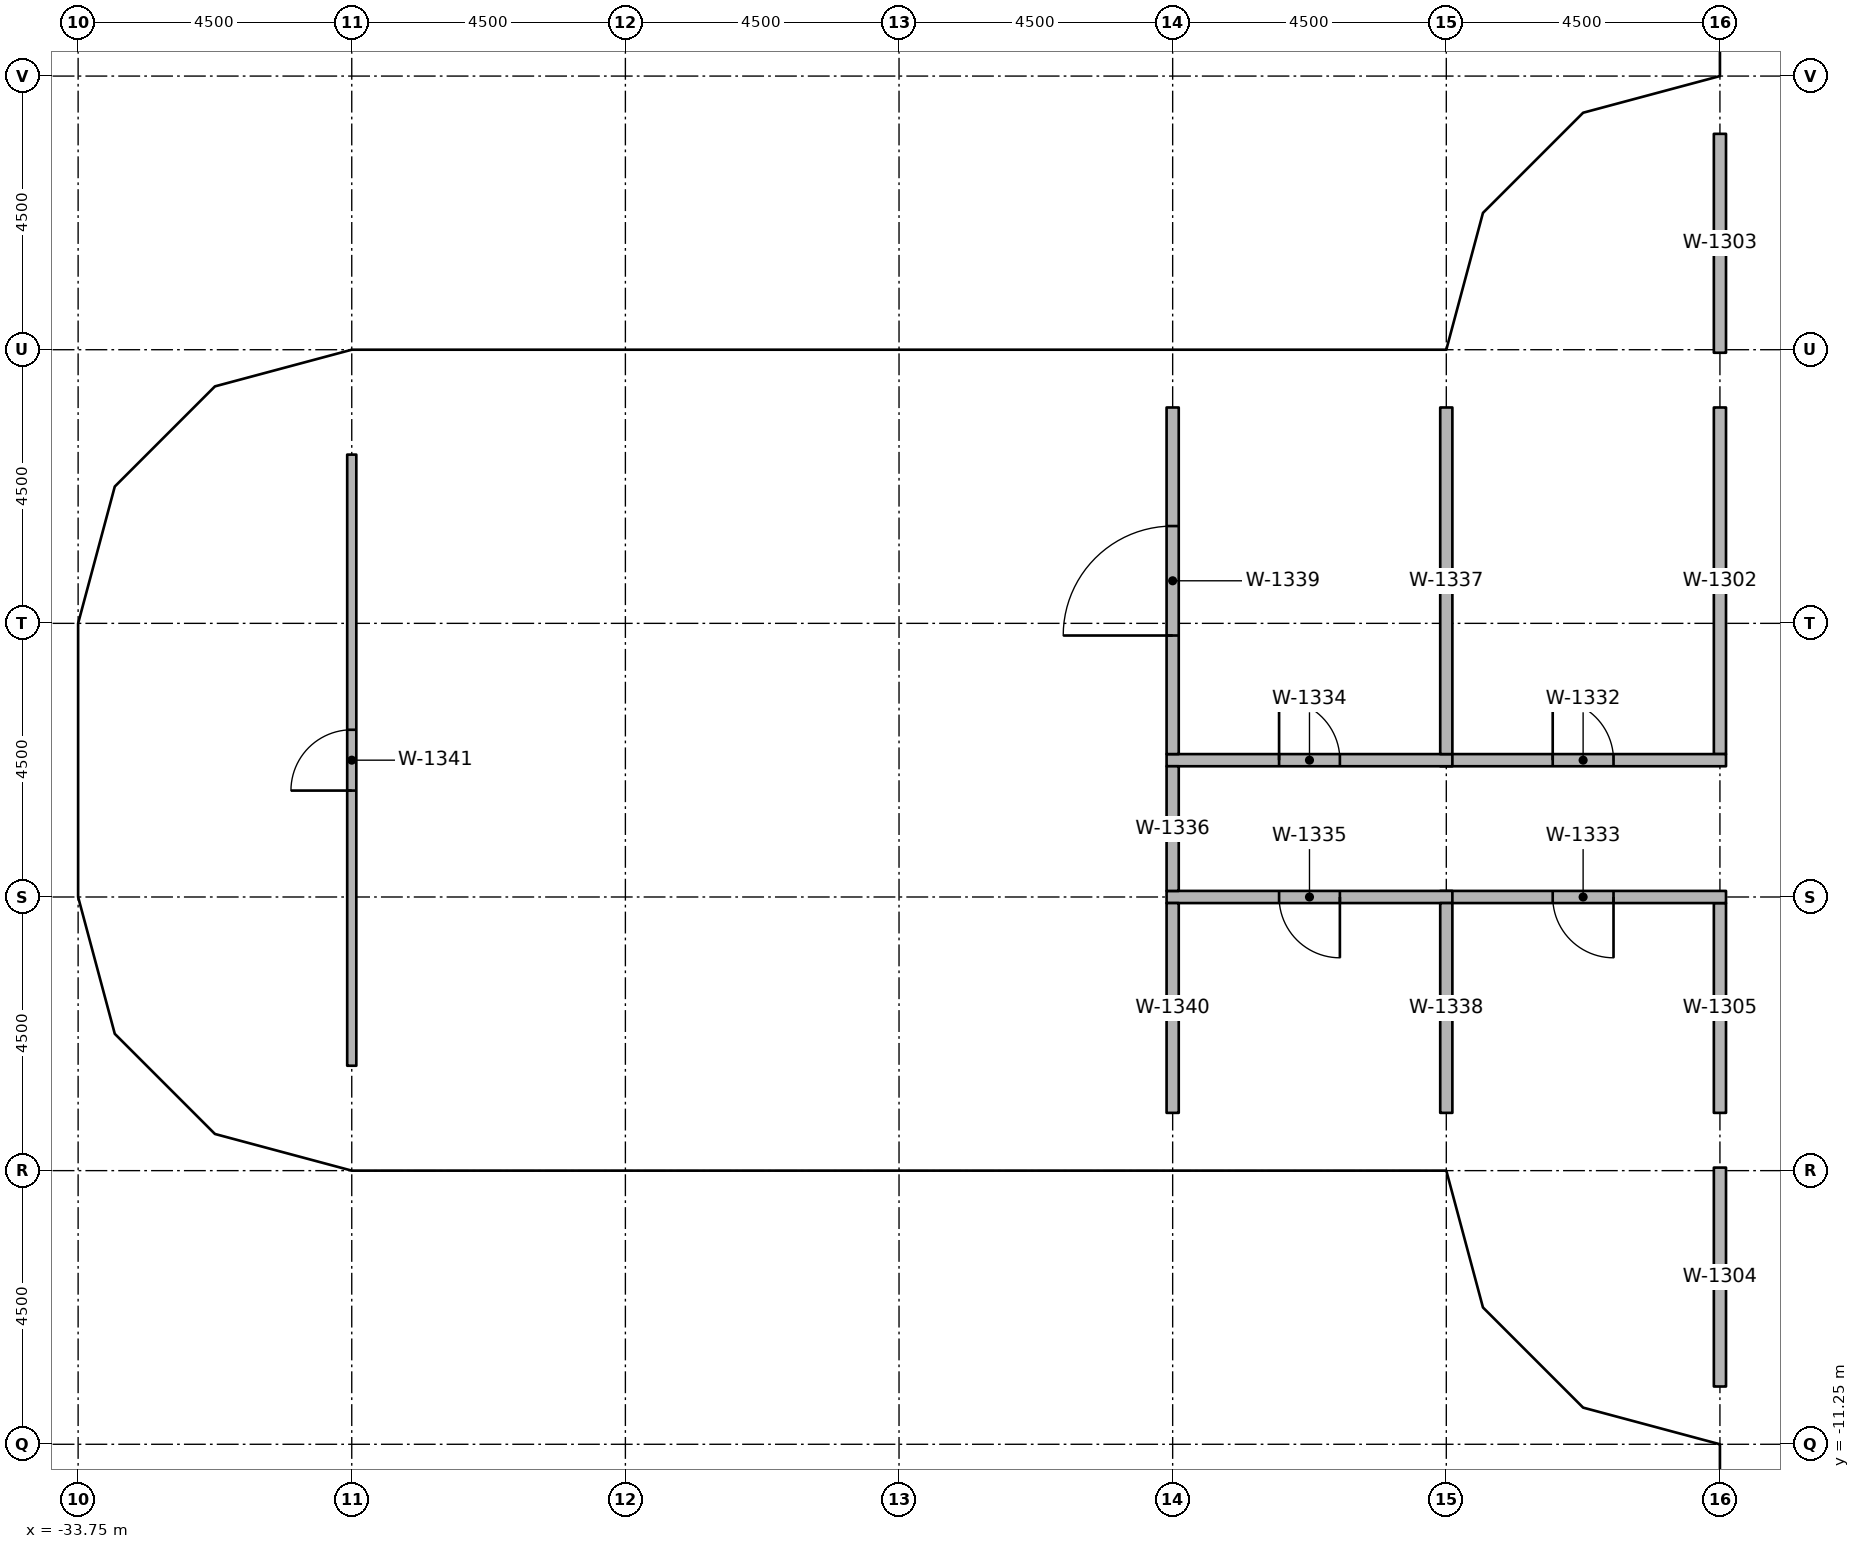
"""IFC4 building model, lengths in metres.
Left out: names, types, materials, properties, quantities, classifications, styles, units other than length and angle.
Written with IfcOpenShell. Run it as: python <this file> out.ifc"""

import sys

from ifc_helpers import new_model, si_unit, direction, frame, frame_2d, origin, origin_2d, place, context, subcontext, project, spatial, rectangle, extrude, element, fill, save


model = new_model("IFC4")
c1 = context("Model", 3, precision=1e-05, world=origin(), true_north=direction((0.0, 1.0)))
c2 = subcontext(c1, "Body", "Model", "MODEL_VIEW")
j1 = project(units=[si_unit("LENGTHUNIT", "METRE"), si_unit("PLANEANGLEUNIT", "RADIAN")], contexts=[c1])
p1 = place(None, origin())
s1 = spatial("IfcSite", under=j1, at=p1, CompositionType="ELEMENT")
p2 = place(p1, origin())
s2 = spatial("IfcBuilding", under=s1, at=p2, CompositionType="ELEMENT")
p3 = place(p2, frame((0.0, 0.0, 132.2)))
s3 = spatial("IfcBuildingStorey", under=s2, at=p3, CompositionType="ELEMENT", Elevation=132.2)
for number, where, z_axis, x_axis in (
    (1, (-33.11, -2.25, 0.0), (0.0, 0.0, 1.0), (1.0, 0.0, 0.0)),
    (2, (-33.11, 2.25, 0.0), (0.0, 0.0, 1.0), (1.0, 0.0, 0.0)),
    (3, (-28.908, -5.475, 0.0), (0.0, 0.0, 1.0), (1.0, 0.0, 0.0)),
    (4, (-28.908, 5.475, 0.0), (0.0, 0.0, 1.0), (1.0, 0.0, 0.0)),
    (5, (-24.75, -6.25, 0.0), (0.0, 0.0, 1.0), (1.0, 0.0, 0.0)),
    (6, (-24.75, 6.25, 0.0), (0.0, 0.0, 1.0), (1.0, 0.0, 0.0)),
    (7, (-20.25, -6.11, 0.0), (0.0, 0.0, 1.0), (1.0, 0.0, 0.0)),
    (8, (-20.25, 6.11, 0.0), (0.0, 0.0, 1.0), (1.0, 0.0, 0.0)),
    (9, (-15.75, -6.25, 0.0), (0.0, 0.0, 1.0), (1.0, 0.0, 0.0)),
    (10, (-15.75, 6.25, 0.0), (0.0, 0.0, 1.0), (1.0, 0.0, 0.0)),
    (11, (-10.75, -6.25, 0.0), (0.0, 0.0, 1.0), (1.0, 0.0, 0.0)),
    (12, (-10.75, 6.25, 0.0), (0.0, 0.0, 1.0), (1.0, 0.0, 0.0)),
    (13, (-6.25, -10.75, 0.0), (0.0, 0.0, 1.0), (1.0, 0.0, 0.0)),
    (14, (-6.25, -6.25, 0.0), (0.0, 0.0, 1.0), (1.0, 0.0, 0.0)),
    (15, (-6.25, 6.25, 0.0), (0.0, 0.0, 1.0), (1.0, 0.0, 0.0)),
    (16, (-6.25, 10.75, 0.0), (0.0, 0.0, 1.0), (1.0, 0.0, 0.0)),
):
    element("IfcColumn", number, at=place(p3, frame(where, z_axis=z_axis, x_axis=x_axis)), inside=s3, PredefinedType="COLUMN", context=c2, shape_type="SweptSolid", body=[
        extrude(rectangle(XDim=0.9, YDim=0.9, at=origin_2d()), origin(), (0.0, 0.0, 1.0), 3.65),
    ])
p4 = place(p3, frame((-6.75, 0.1, 0.0), z_axis=(0.0, 0.0, 1.0), x_axis=(0.0, 1.0, 0.0)))
e17 = element("IfcWall", 17, at=p4, inside=s3, PredefinedType="PARTITIONING", context=c2, shape_type="SweptSolid", body=[
    extrude(rectangle(XDim=5.7, YDim=0.2, at=frame_2d((2.85, 0.0))), origin(), (0.0, 0.0, 1.0), 2.738),
])
for number, where, z_axis, x_axis in (
    (18, (-6.75, 6.7, 0.0), (0.0, 0.0, 1.0), (0.0, 1.0, 0.0)),
    (19, (-6.75, -10.3, 0.0), (0.0, 0.0, 1.0), (0.0, 1.0, 0.0)),
):
    element("IfcWall", number, at=place(p3, frame(where, z_axis=z_axis, x_axis=x_axis)), inside=s3, PredefinedType="PARTITIONING", context=c2, shape_type="SweptSolid", body=[
        extrude(rectangle(XDim=3.6, YDim=0.2, at=frame_2d((1.8, 0.0))), origin(), (0.0, 0.0, 1.0), 2.738),
    ])
p5 = place(p3, frame((-6.75, -5.8, 0.0), z_axis=(0.0, 0.0, 1.0), x_axis=(0.0, 1.0, 0.0)))
e20 = element("IfcWall", 20, at=p5, inside=s3, PredefinedType="PARTITIONING", context=c2, shape_type="SweptSolid", body=[
    extrude(rectangle(XDim=3.45, YDim=0.2, at=frame_2d((1.725, 0.0))), origin(), (0.0, 0.0, 1.0), 2.738),
])
p6 = place(p3, frame((-11.35, 0.0, 0.0), z_axis=(0.0, 0.0, 1.0), x_axis=(1.0, 0.0, 0.0)))
e21 = element("IfcWall", 21, at=p6, inside=s3, PredefinedType="PARTITIONING", context=c2, shape_type="SweptSolid", body=[
    extrude(rectangle(XDim=4.7, YDim=0.2, at=frame_2d((2.35, 0.0))), origin(), (0.0, 0.0, 1.0), 2.738),
])
p7 = place(p6, frame((1.85, 0.0, 0.0)))
e22 = element("IfcOpeningElement", 22, at=p7, cuts=e21, PredefinedType="OPENING", context=c2, shape_type="SweptSolid", body=[
    extrude(rectangle(XDim=1.0, YDim=2.1, at=frame_2d((0.5, 1.05))), frame((0.0, 0.11, 0.0), z_axis=(0.0, -1.0, 0.0), x_axis=(1.0, 0.0, 0.0)), (0.0, 0.0, 1.0), 0.22),
])
p8 = place(p3, frame((-6.65, -2.25, 0.0), z_axis=(0.0, 0.0, 1.0), x_axis=(-1.0, 0.0, 0.0)))
e23 = element("IfcWall", 23, at=p8, inside=s3, PredefinedType="PARTITIONING", context=c2, shape_type="SweptSolid", body=[
    extrude(rectangle(XDim=4.7, YDim=0.2, at=frame_2d((2.35, 0.0))), origin(), (0.0, 0.0, 1.0), 2.738),
])
p9 = place(p8, frame((1.85, 0.0, 0.0)))
e24 = element("IfcOpeningElement", 24, at=p9, cuts=e23, PredefinedType="OPENING", context=c2, shape_type="SweptSolid", body=[
    extrude(rectangle(XDim=1.0, YDim=2.1, at=frame_2d((0.5, 1.05))), frame((0.0, 0.11, 0.0), z_axis=(0.0, -1.0, 0.0), x_axis=(1.0, 0.0, 0.0)), (0.0, 0.0, 1.0), 0.22),
])
p10 = place(p3, frame((-15.85, 0.0, 0.0), z_axis=(0.0, 0.0, 1.0), x_axis=(1.0, 0.0, 0.0)))
e25 = element("IfcWall", 25, at=p10, inside=s3, PredefinedType="PARTITIONING", context=c2, shape_type="SweptSolid", body=[
    extrude(rectangle(XDim=4.7, YDim=0.2, at=frame_2d((2.35, 0.0))), origin(), (0.0, 0.0, 1.0), 2.738),
])
p11 = place(p10, frame((1.85, 0.0, 0.0)))
e26 = element("IfcOpeningElement", 26, at=p11, cuts=e25, PredefinedType="OPENING", context=c2, shape_type="SweptSolid", body=[
    extrude(rectangle(XDim=1.0, YDim=2.1, at=frame_2d((0.5, 1.05))), frame((0.0, 0.11, 0.0), z_axis=(0.0, -1.0, 0.0), x_axis=(1.0, 0.0, 0.0)), (0.0, 0.0, 1.0), 0.22),
])
p12 = place(p3, frame((-11.15, -2.25, 0.0), z_axis=(0.0, 0.0, 1.0), x_axis=(-1.0, 0.0, 0.0)))
e27 = element("IfcWall", 27, at=p12, inside=s3, PredefinedType="PARTITIONING", context=c2, shape_type="SweptSolid", body=[
    extrude(rectangle(XDim=4.7, YDim=0.2, at=frame_2d((2.35, 0.0))), origin(), (0.0, 0.0, 1.0), 2.738),
])
p13 = place(p12, frame((1.85, 0.0, 0.0)))
e28 = element("IfcOpeningElement", 28, at=p13, cuts=e27, PredefinedType="OPENING", context=c2, shape_type="SweptSolid", body=[
    extrude(rectangle(XDim=1.0, YDim=2.1, at=frame_2d((0.5, 1.05))), frame((0.0, 0.11, 0.0), z_axis=(0.0, -1.0, 0.0), x_axis=(1.0, 0.0, 0.0)), (0.0, 0.0, 1.0), 0.22),
])
p14 = place(p3, frame((-15.75, -2.15, 0.0), z_axis=(0.0, 0.0, 1.0), x_axis=(0.0, 1.0, 0.0)))
e29 = element("IfcWall", 29, at=p14, inside=s3, PredefinedType="PARTITIONING", context=c2, shape_type="SweptSolid", body=[
    extrude(rectangle(XDim=2.05, YDim=0.2, at=frame_2d((1.025, 0.0))), origin(), (0.0, 0.0, 1.0), 2.738),
])
p15 = place(p3, frame((-11.25, 0.1, 0.0), z_axis=(0.0, 0.0, 1.0), x_axis=(0.0, 1.0, 0.0)))
e30 = element("IfcWall", 30, at=p15, inside=s3, PredefinedType="PARTITIONING", context=c2, shape_type="SweptSolid", body=[
    extrude(rectangle(XDim=5.7, YDim=0.2, at=frame_2d((2.85, 0.0))), origin(), (0.0, 0.0, 1.0), 2.738),
])
p16 = place(p3, frame((-11.25, -5.8, 0.0), z_axis=(0.0, 0.0, 1.0), x_axis=(0.0, 1.0, 0.0)))
e31 = element("IfcWall", 31, at=p16, inside=s3, PredefinedType="PARTITIONING", context=c2, shape_type="SweptSolid", body=[
    extrude(rectangle(XDim=3.45, YDim=0.2, at=frame_2d((1.725, 0.0))), origin(), (0.0, 0.0, 1.0), 2.738),
])
p17 = place(p3, frame((-15.75, 0.1, 0.0), z_axis=(0.0, 0.0, 1.0), x_axis=(0.0, 1.0, 0.0)))
e32 = element("IfcWall", 32, at=p17, inside=s3, PredefinedType="PARTITIONING", context=c2, shape_type="SweptSolid", body=[
    extrude(rectangle(XDim=5.7, YDim=0.2, at=frame_2d((2.85, 0.0))), origin(), (0.0, 0.0, 1.0), 2.738),
])
p18 = place(p17, frame((1.95, 0.0, 0.0)))
e33 = element("IfcOpeningElement", 33, at=p18, cuts=e32, PredefinedType="OPENING", context=c2, shape_type="SweptSolid", body=[
    extrude(rectangle(XDim=1.8, YDim=2.1, at=frame_2d((0.9, 1.05))), frame((0.0, 0.11, 0.0), z_axis=(0.0, -1.0, 0.0), x_axis=(1.0, 0.0, 0.0)), (0.0, 0.0, 1.0), 0.22),
])
p19 = place(p3, frame((-15.75, -5.8, 0.0), z_axis=(0.0, 0.0, 1.0), x_axis=(0.0, 1.0, 0.0)))
e34 = element("IfcWall", 34, at=p19, inside=s3, PredefinedType="PARTITIONING", context=c2, shape_type="SweptSolid", body=[
    extrude(rectangle(XDim=3.45, YDim=0.2, at=frame_2d((1.725, 0.0))), origin(), (0.0, 0.0, 1.0), 2.738),
])
p20 = place(p3, frame((-29.25, -5.025, 0.0), z_axis=(0.0, 0.0, 1.0), x_axis=(0.0, 1.0, 0.0)))
e35 = element("IfcWall", 35, at=p20, inside=s3, PredefinedType="PARTITIONING", context=c2, shape_type="SweptSolid", body=[
    extrude(rectangle(XDim=10.05, YDim=0.15, at=frame_2d((5.025, 0.0))), origin(), (0.0, 0.0, 1.0), 2.738),
])
p21 = place(p20, frame((4.525, 0.0, 0.0)))
e36 = element("IfcOpeningElement", 36, at=p21, cuts=e35, PredefinedType="OPENING", context=c2, shape_type="SweptSolid", body=[
    extrude(rectangle(XDim=1.0, YDim=2.1, at=frame_2d((0.5, 1.05))), frame((0.0, 0.085, 0.0), z_axis=(0.0, -1.0, 0.0), x_axis=(1.0, 0.0, 0.0)), (0.0, 0.0, 1.0), 0.17),
])
p22 = place(p21, origin())
e37 = element("IfcDoor", 37, at=p22, inside=s3, OperationType="SINGLE_SWING_RIGHT", PredefinedType="DOOR", context=c2, shape_type="SweptSolid", body=[
    extrude(rectangle(XDim=1.0, YDim=2.1, at=frame_2d((0.5, 1.05))), frame((0.0, 0.025, 0.0), z_axis=(0.0, -1.0, 0.0), x_axis=(1.0, 0.0, 0.0)), (0.0, 0.0, 1.0), 0.05),
])
fill(e36, e37)
p23 = place(p18, origin())
e38 = element("IfcDoor", 38, at=p23, inside=s3, OperationType="DOUBLE_DOOR_SINGLE_SWING", PredefinedType="DOOR", context=c2, shape_type="SweptSolid", body=[
    extrude(rectangle(XDim=1.8, YDim=2.1, at=frame_2d((0.9, 1.05))), frame((0.0, 0.025, 0.0), z_axis=(0.0, -1.0, 0.0), x_axis=(1.0, 0.0, 0.0)), (0.0, 0.0, 1.0), 0.05),
])
fill(e33, e38)
p24 = place(p7, origin())
e39 = element("IfcDoor", 39, at=p24, inside=s3, OperationType="SINGLE_SWING_RIGHT", PredefinedType="DOOR", context=c2, shape_type="SweptSolid", body=[
    extrude(rectangle(XDim=1.0, YDim=2.1, at=frame_2d((0.5, 1.05))), frame((0.0, 0.025, 0.0), z_axis=(0.0, -1.0, 0.0), x_axis=(1.0, 0.0, 0.0)), (0.0, 0.0, 1.0), 0.05),
])
fill(e22, e39)
p25 = place(p11, origin())
e40 = element("IfcDoor", 40, at=p25, inside=s3, OperationType="SINGLE_SWING_RIGHT", PredefinedType="DOOR", context=c2, shape_type="SweptSolid", body=[
    extrude(rectangle(XDim=1.0, YDim=2.1, at=frame_2d((0.5, 1.05))), frame((0.0, 0.025, 0.0), z_axis=(0.0, -1.0, 0.0), x_axis=(1.0, 0.0, 0.0)), (0.0, 0.0, 1.0), 0.05),
])
fill(e26, e40)
p26 = place(p9, origin())
e41 = element("IfcDoor", 41, at=p26, inside=s3, OperationType="SINGLE_SWING_RIGHT", PredefinedType="DOOR", context=c2, shape_type="SweptSolid", body=[
    extrude(rectangle(XDim=1.0, YDim=2.1, at=frame_2d((0.5, 1.05))), frame((0.0, 0.025, 0.0), z_axis=(0.0, -1.0, 0.0), x_axis=(1.0, 0.0, 0.0)), (0.0, 0.0, 1.0), 0.05),
])
fill(e24, e41)
p27 = place(p13, origin())
e42 = element("IfcDoor", 42, at=p27, inside=s3, OperationType="SINGLE_SWING_RIGHT", PredefinedType="DOOR", context=c2, shape_type="SweptSolid", body=[
    extrude(rectangle(XDim=1.0, YDim=2.1, at=frame_2d((0.5, 1.05))), frame((0.0, 0.025, 0.0), z_axis=(0.0, -1.0, 0.0), x_axis=(1.0, 0.0, 0.0)), (0.0, 0.0, 1.0), 0.05),
])
fill(e28, e42)
save(model, sys.argv[1])
